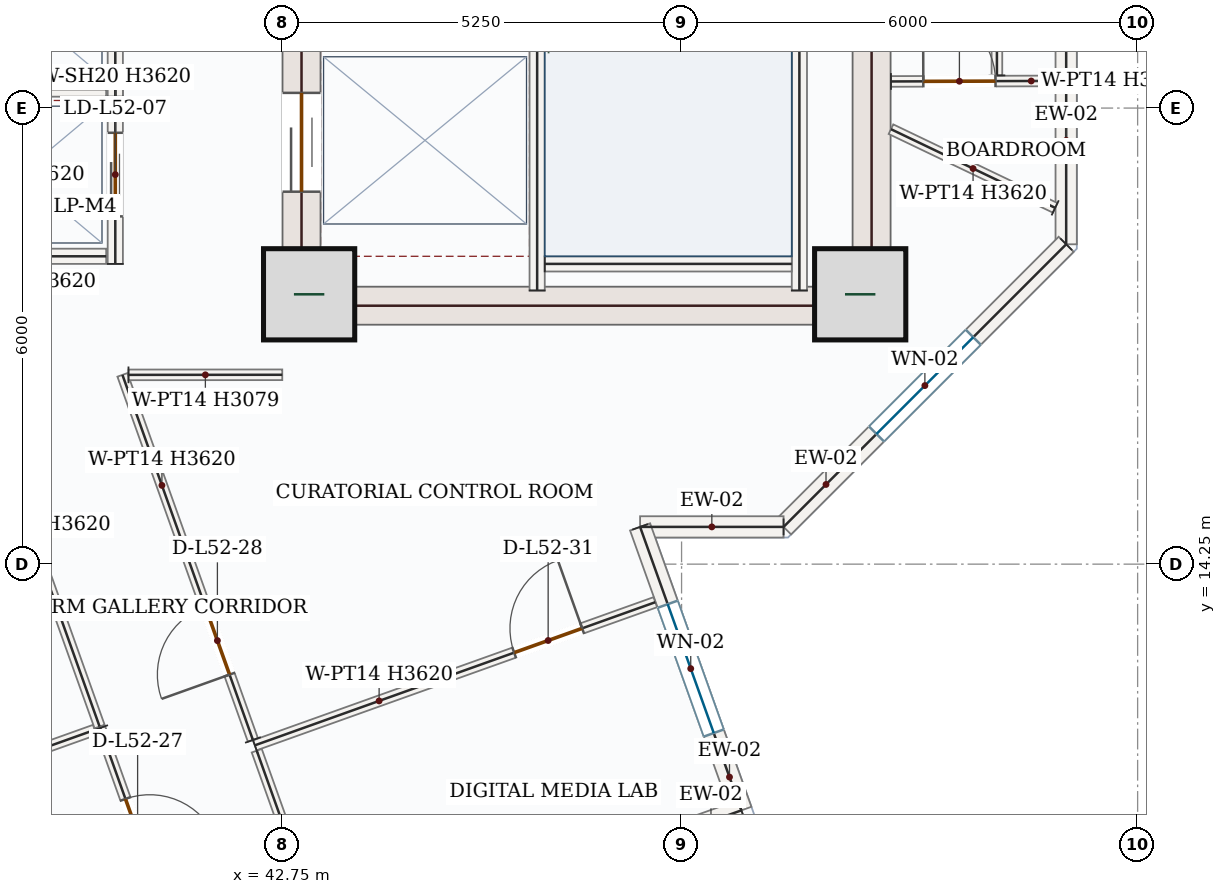
"""IFC4 building model, lengths in metres.
Left out: names, types, materials, properties, quantities, classifications, styles, units other than length and angle.
Written with IfcOpenShell. Run it as: python <this file> out.ifc"""

import sys

from ifc_helpers import new_model, si_unit, direction, frame, frame_2d, origin, origin_2d, place, context, subcontext, project, spatial, rectangle, extrude, source, transform, mapped, element, fill, save


model = new_model("IFC4")
c1 = context("Model", 3, precision=1e-05, world=origin(), true_north=direction((0.0, 1.0)))
c2 = subcontext(c1, "Body", "Model", "MODEL_VIEW")
j1 = project(units=[si_unit("LENGTHUNIT", "METRE"), si_unit("PLANEANGLEUNIT", "RADIAN")], contexts=[c1])
p1 = place(None, origin())
s1 = spatial("IfcSite", under=j1, at=p1, CompositionType="ELEMENT")
p2 = place(p1, origin())
s2 = spatial("IfcBuilding", under=s1, at=p2, CompositionType="ELEMENT")
p3 = place(p2, frame((0.0, 0.0, 221.4)))
s3 = spatial("IfcBuildingStorey", under=s2, at=p3, CompositionType="ELEMENT", Elevation=221.4)
p4 = place(p3, frame((43.0, 17.4, 0.0), z_axis=(0.0, 0.0, 1.0), x_axis=(0.0, 1.0, 0.0)))
e1 = element("IfcWall", 1, at=p4, inside=s3, PredefinedType="SHEAR", context=c2, shape_type="SweptSolid", body=[
    extrude(rectangle(XDim=8.55, YDim=0.5, at=frame_2d((4.275, 0.0))), origin(), (0.0, 0.0, 1.0), 3.62),
])
p5 = place(p4, frame((6.65, 0.0, 0.0)))
e2 = element("IfcOpeningElement", 2, at=p5, cuts=e1, PredefinedType="OPENING", context=c2, shape_type="SweptSolid", body=[
    extrude(rectangle(XDim=1.1, YDim=2.2, at=frame_2d((0.55, 1.1))), frame((0.0, 0.26, 0.0), z_axis=(0.0, -1.0, 0.0), x_axis=(1.0, 0.0, 0.0)), (0.0, 0.0, 1.0), 0.52),
])
p6 = place(p4, frame((1.75, 0.0, 0.0)))
e3 = element("IfcOpeningElement", 3, at=p6, cuts=e1, PredefinedType="OPENING", context=c2, shape_type="SweptSolid", body=[
    extrude(rectangle(XDim=1.3, YDim=2.2, at=frame_2d((0.65, 1.1))), frame((0.0, 0.26, 0.0), z_axis=(0.0, -1.0, 0.0), x_axis=(1.0, 0.0, 0.0)), (0.0, 0.0, 1.0), 0.52),
])
p7 = place(p4, frame((4.55, 0.0, 0.0)))
e4 = element("IfcOpeningElement", 4, at=p7, cuts=e1, PredefinedType="OPENING", context=c2, shape_type="SweptSolid", body=[
    extrude(rectangle(XDim=0.88, YDim=2.1, at=frame_2d((0.44, 1.05))), frame((0.0, 0.26, 0.0), z_axis=(0.0, -1.0, 0.0), x_axis=(1.0, 0.0, 0.0)), (0.0, 0.0, 1.0), 0.52),
])
m1 = source(origin(), c2, "Body", "SweptSolid", [
    extrude(rectangle(XDim=8.55, YDim=0.5, at=frame_2d((4.275, 0.0))), origin(), (0.0, 0.0, 1.0), 3.62),
])
p8 = place(p3, frame((50.5, 17.4, 0.0), z_axis=(0.0, 0.0, 1.0), x_axis=(0.0, 1.0, 0.0)))
e5 = element("IfcWall", 5, at=p8, inside=s3, PredefinedType="SHEAR", context=c2, shape_type="MappedRepresentation", body=[
    mapped(m1, transform((0.0, 0.0, 0.0), x_axis=(1.0, 0.0, 0.0), y_axis=(0.0, 1.0, 0.0), z_axis=(0.0, 0.0, 1.0), scale=1.0)),
])
m2 = source(origin(), c2, "Body", "SweptSolid", [
    extrude(rectangle(XDim=7.0, YDim=0.5, at=frame_2d((3.5, 0.0))), origin(), (0.0, 0.0, 1.0), 3.62),
])
p9 = place(p3, frame((43.25, 17.65, 0.0), z_axis=(0.0, 0.0, 1.0), x_axis=(1.0, 0.0, 0.0)))
e6 = element("IfcWall", 6, at=p9, inside=s3, PredefinedType="SHEAR", context=c2, shape_type="MappedRepresentation", body=[
    mapped(m2, transform((0.0, 0.0, 0.0), x_axis=(1.0, 0.0, 0.0), y_axis=(0.0, 1.0, 0.0), z_axis=(0.0, 0.0, 1.0), scale=1.0)),
])
m3 = source(origin(), c2, "Body", "SweptSolid", [
    extrude(rectangle(XDim=1.2, YDim=1.2, at=origin_2d()), origin(), (0.0, 0.0, 1.0), 3.9),
])
for number, where, z_axis, x_axis in (
    (7, (43.1, 17.8, 0.0), (0.0, 0.0, 1.0), (1.0, 0.0, 0.0)),
    (8, (50.35, 17.8, 0.0), (0.0, 0.0, 1.0), (1.0, 0.0, 0.0)),
):
    element("IfcColumn", number, at=place(p3, frame(where, z_axis=z_axis, x_axis=x_axis)), inside=s3, PredefinedType="COLUMN", context=c2, shape_type="MappedRepresentation", body=[
        mapped(m3, transform((0.0, 0.0, 0.0), x_axis=(1.0, 0.0, 0.0), y_axis=(0.0, 1.0, 0.0), z_axis=(0.0, 0.0, 1.0), scale=1.0)),
    ])
p10 = place(p3, frame((53.06, 26.025, 0.0), z_axis=(0.0, 0.0, 1.0), x_axis=(0.0, -1.0, 0.0)))
e9 = element("IfcWall", 9, at=p10, inside=s3, PredefinedType="SOLIDWALL", context=c2, shape_type="SweptSolid", body=[
    extrude(rectangle(XDim=7.567, YDim=0.28, at=frame_2d((3.783, 0.0))), origin(), (0.0, 0.0, 1.0), 3.62),
])
p11 = place(p10, frame((2.883, 0.0, 0.85)))
e10 = element("IfcOpeningElement", 10, at=p11, cuts=e9, PredefinedType="OPENING", context=c2, shape_type="SweptSolid", body=[
    extrude(rectangle(XDim=1.8, YDim=1.75, at=frame_2d((0.9, 0.875))), frame((0.0, 0.15, 0.0), z_axis=(0.0, -1.0, 0.0), x_axis=(1.0, 0.0, 0.0)), (0.0, 0.0, 1.0), 0.3),
])
p12 = place(p3, frame((53.06, 18.458, 0.0), z_axis=(0.0, 0.0, 1.0), x_axis=(-0.707106781187, -0.707106781187, 0.0)))
e11 = element("IfcWall", 11, at=p12, inside=s3, PredefinedType="SOLIDWALL", context=c2, shape_type="SweptSolid", body=[
    extrude(rectangle(XDim=5.258, YDim=0.28, at=frame_2d((2.629, 0.0))), origin(), (0.0, 0.0, 1.0), 3.62),
])
p13 = place(p12, frame((1.729, 0.0, 0.85)))
e12 = element("IfcOpeningElement", 12, at=p13, cuts=e11, PredefinedType="OPENING", context=c2, shape_type="SweptSolid", body=[
    extrude(rectangle(XDim=1.8, YDim=1.75, at=frame_2d((0.9, 0.875))), frame((0.0, 0.15, 0.0), z_axis=(0.0, -1.0, 0.0), x_axis=(1.0, 0.0, 0.0)), (0.0, 0.0, 1.0), 0.3),
])
m4 = source(origin(), c2, "Body", "SweptSolid", [
    extrude(rectangle(XDim=1.888, YDim=0.28, at=frame_2d((0.944, 0.0))), origin(), (0.0, 0.0, 1.0), 3.62),
])
p14 = place(p3, frame((49.342, 14.74, 0.0), z_axis=(0.0, 0.0, 1.0), x_axis=(-1.0, 0.0, 0.0)))
e13 = element("IfcWall", 13, at=p14, inside=s3, PredefinedType="SOLIDWALL", context=c2, shape_type="MappedRepresentation", body=[
    mapped(m4, transform((0.0, 0.0, 0.0), x_axis=(1.0, 0.0, 0.0), y_axis=(0.0, 1.0, 0.0), z_axis=(0.0, 0.0, 1.0), scale=1.0)),
])
p15 = place(p3, frame((47.454, 14.74, 0.0), z_axis=(0.0, 0.0, 1.0), x_axis=(0.336590223561, -0.941651220677, 0.0)))
e14 = element("IfcWall", 14, at=p15, inside=s3, PredefinedType="SOLIDWALL", context=c2, shape_type="SweptSolid", body=[
    extrude(rectangle(XDim=3.96, YDim=0.28, at=frame_2d((1.98, 0.0))), origin(), (0.0, 0.0, 1.0), 3.62),
])
p16 = place(p15, frame((1.08, 0.0, 0.85)))
e15 = element("IfcOpeningElement", 15, at=p16, cuts=e14, PredefinedType="OPENING", context=c2, shape_type="SweptSolid", body=[
    extrude(rectangle(XDim=1.8, YDim=1.75, at=frame_2d((0.9, 0.875))), frame((0.0, 0.15, 0.0), z_axis=(0.0, -1.0, 0.0), x_axis=(1.0, 0.0, 0.0)), (0.0, 0.0, 1.0), 0.3),
])
m5 = source(origin(), c2, "Body", "SweptSolid", [
    extrude(rectangle(XDim=0.85, YDim=0.28, at=frame_2d((0.425, 0.0))), origin(), (0.0, 0.0, 1.0), 3.62),
])
p17 = place(p3, frame((48.787, 11.011, 0.0), z_axis=(0.0, 0.0, 1.0), x_axis=(-0.941657417713, -0.336572886112, 0.0)))
e16 = element("IfcWall", 16, at=p17, inside=s3, PredefinedType="SOLIDWALL", context=c2, shape_type="MappedRepresentation", body=[
    mapped(m5, transform((0.0, 0.0, 0.0), x_axis=(1.0, 0.0, 0.0), y_axis=(0.0, 1.0, 0.0), z_axis=(0.0, 0.0, 1.0), scale=1.0)),
])
m6 = source(origin(), c2, "Body", "SweptSolid", [
    extrude(rectangle(XDim=7.87, YDim=0.2, at=frame_2d((3.935, 0.0))), origin(), (0.0, 0.0, 1.0), 3.62),
])
p18 = place(p3, frame((49.55, 17.85, 0.0), z_axis=(0.0, 0.0, 1.0), x_axis=(0.0, 1.0, 0.0)))
e17 = element("IfcWall", 17, at=p18, inside=s3, PredefinedType="SOLIDWALL", context=c2, shape_type="MappedRepresentation", body=[
    mapped(m6, transform((0.0, 0.0, 0.0), x_axis=(1.0, 0.0, 0.0), y_axis=(0.0, 1.0, 0.0), z_axis=(0.0, 0.0, 1.0), scale=1.0)),
])
p19 = place(p3, frame((46.1, 17.85, 0.0), z_axis=(0.0, 0.0, 1.0), x_axis=(0.0, 1.0, 0.0)))
e18 = element("IfcWall", 18, at=p19, inside=s3, PredefinedType="SOLIDWALL", context=c2, shape_type="SweptSolid", body=[
    extrude(rectangle(XDim=8.0, YDim=0.2, at=frame_2d((4.0, 0.0))), origin(), (0.0, 0.0, 1.0), 3.62),
])
p20 = place(p19, frame((6.3, 0.0, 0.0)))
e19 = element("IfcOpeningElement", 19, at=p20, cuts=e18, PredefinedType="OPENING", context=c2, shape_type="SweptSolid", body=[
    extrude(rectangle(XDim=1.05, YDim=2.15, at=frame_2d((0.525, 1.075))), frame((0.0, 0.11, 0.0), z_axis=(0.0, -1.0, 0.0), x_axis=(1.0, 0.0, 0.0)), (0.0, 0.0, 1.0), 0.22),
])
m7 = source(origin(), c2, "Body", "SweptSolid", [
    extrude(rectangle(XDim=3.25, YDim=0.2, at=frame_2d((1.625, 0.0))), origin(), (0.0, 0.0, 1.0), 3.62),
])
p21 = place(p3, frame((46.2, 18.2, 0.0), z_axis=(0.0, 0.0, 1.0), x_axis=(1.0, 0.0, 0.0)))
e20 = element("IfcWall", 20, at=p21, inside=s3, PredefinedType="SOLIDWALL", context=c2, shape_type="MappedRepresentation", body=[
    mapped(m7, transform((0.0, 0.0, 0.0), x_axis=(1.0, 0.0, 0.0), y_axis=(0.0, 1.0, 0.0), z_axis=(0.0, 0.0, 1.0), scale=1.0)),
])
p22 = place(p3, frame((40.55, 20.4, 0.0), z_axis=(0.0, 0.0, 1.0), x_axis=(0.0, 1.0, 0.0)))
e21 = element("IfcWall", 21, at=p22, inside=s3, PredefinedType="SOLIDWALL", context=c2, shape_type="SweptSolid", body=[
    extrude(rectangle(XDim=2.35, YDim=0.2, at=frame_2d((1.175, 0.0))), origin(), (0.0, 0.0, 1.0), 3.62),
])
p23 = place(p22, frame((0.625, 0.0, 0.0)))
e22 = element("IfcOpeningElement", 22, at=p23, cuts=e21, PredefinedType="OPENING", context=c2, shape_type="SweptSolid", body=[
    extrude(rectangle(XDim=1.1, YDim=2.15, at=frame_2d((0.55, 1.075))), frame((0.0, 0.11, 0.0), z_axis=(0.0, -1.0, 0.0), x_axis=(1.0, 0.0, 0.0)), (0.0, 0.0, 1.0), 0.22),
])
m8 = source(origin(), c2, "Body", "SweptSolid", [
    extrude(rectangle(XDim=2.26, YDim=0.2, at=frame_2d((1.13, 0.0))), origin(), (0.0, 0.0, 1.0), 3.62),
])
p24 = place(p3, frame((38.17, 20.5, 0.0), z_axis=(0.0, 0.0, 1.0), x_axis=(1.0, 0.0, 0.0)))
e23 = element("IfcWall", 23, at=p24, inside=s3, PredefinedType="SOLIDWALL", context=c2, shape_type="MappedRepresentation", body=[
    mapped(m8, transform((0.0, 0.0, 0.0), x_axis=(1.0, 0.0, 0.0), y_axis=(0.0, 1.0, 0.0), z_axis=(0.0, 0.0, 1.0), scale=1.0)),
])
p25 = place(p3, frame((40.55, 18.2, 0.0), z_axis=(0.0, 0.0, 1.0), x_axis=(0.0, 1.0, 0.0)))
e24 = element("IfcWall", 24, at=p25, inside=s3, PredefinedType="SOLIDWALL", context=c2, shape_type="SweptSolid", body=[
    extrude(rectangle(XDim=2.35, YDim=0.2, at=frame_2d((1.175, 0.0))), origin(), (0.0, 0.0, 1.0), 3.62),
])
p26 = place(p25, frame((0.625, 0.0, 0.0)))
e25 = element("IfcOpeningElement", 25, at=p26, cuts=e24, PredefinedType="OPENING", context=c2, shape_type="SweptSolid", body=[
    extrude(rectangle(XDim=1.1, YDim=2.15, at=frame_2d((0.55, 1.075))), frame((0.0, 0.11, 0.0), z_axis=(0.0, -1.0, 0.0), x_axis=(1.0, 0.0, 0.0)), (0.0, 0.0, 1.0), 0.22),
])
p27 = place(p3, frame((38.17, 18.3, 0.0), z_axis=(0.0, 0.0, 1.0), x_axis=(1.0, 0.0, 0.0)))
e26 = element("IfcWall", 26, at=p27, inside=s3, PredefinedType="SOLIDWALL", context=c2, shape_type="MappedRepresentation", body=[
    mapped(m8, transform((0.0, 0.0, 0.0), x_axis=(1.0, 0.0, 0.0), y_axis=(0.0, 1.0, 0.0), z_axis=(0.0, 0.0, 1.0), scale=1.0)),
])
p28 = place(p3, frame((50.755, 20.6, 0.0), z_axis=(0.0, 0.0, 1.0), x_axis=(0.999994277874, 0.003382930575, 0.0)))
e27 = element("IfcWall", 27, at=p28, inside=s3, PredefinedType="PARTITIONING", context=c2, shape_type="SweptSolid", body=[
    extrude(rectangle(XDim=2.165, YDim=0.14, at=frame_2d((1.083, 0.0))), origin(), (0.0, 0.0, 1.0), 3.62),
])
p29 = place(p28, frame((0.425, 0.0, 0.0)))
e28 = element("IfcOpeningElement", 28, at=p29, cuts=e27, PredefinedType="OPENING", context=c2, shape_type="SweptSolid", body=[
    extrude(rectangle(XDim=0.95, YDim=2.15, at=frame_2d((0.475, 1.075))), frame((0.0, 0.08, 0.0), z_axis=(0.0, -1.0, 0.0), x_axis=(1.0, 0.0, 0.0)), (0.0, 0.0, 1.0), 0.16),
])
m9 = source(origin(), c2, "Body", "SweptSolid", [
    extrude(rectangle(XDim=9.038, YDim=0.14, at=frame_2d((4.519, 0.0))), origin(), (0.0, 0.0, 1.0), 2.693),
])
p30 = place(p3, frame((52.149, 20.68, 0.0), z_axis=(0.0, 0.0, 1.0), x_axis=(0.000135065776, 0.999999990879, 0.0)))
e29 = element("IfcWall", 29, at=p30, inside=s3, PredefinedType="PARTITIONING", context=c2, shape_type="MappedRepresentation", body=[
    mapped(m9, transform((0.0, 0.0, 0.0), x_axis=(1.0, 0.0, 0.0), y_axis=(0.0, 1.0, 0.0), z_axis=(0.0, 0.0, 1.0), scale=1.0)),
])
m10 = source(origin(), c2, "Body", "SweptSolid", [
    extrude(rectangle(XDim=2.395, YDim=0.14, at=frame_2d((1.198, 0.0))), origin(), (0.0, 0.0, 1.0), 3.62),
])
p31 = place(p3, frame((52.915, 18.937, 0.0), z_axis=(0.0, 0.0, 1.0), x_axis=(-0.90180278892, 0.432147810242, 0.0)))
e30 = element("IfcWall", 30, at=p31, inside=s3, PredefinedType="PARTITIONING", context=c2, shape_type="MappedRepresentation", body=[
    mapped(m10, transform((0.0, 0.0, 0.0), x_axis=(1.0, 0.0, 0.0), y_axis=(0.0, 1.0, 0.0), z_axis=(0.0, 0.0, 1.0), scale=1.0)),
])
p32 = place(p3, frame((42.386, 11.866, 0.0), z_axis=(0.0, 0.0, 1.0), x_axis=(0.94166093099, 0.336563056568, 0.0)))
e31 = element("IfcWall", 31, at=p32, inside=s3, PredefinedType="PARTITIONING", context=c2, shape_type="SweptSolid", body=[
    extrude(rectangle(XDim=5.595, YDim=0.14, at=frame_2d((2.797, 0.0))), origin(), (0.0, 0.0, 1.0), 3.62),
])
p33 = place(p32, frame((3.623, 0.0, 0.0)))
e32 = element("IfcOpeningElement", 32, at=p33, cuts=e31, PredefinedType="OPENING", context=c2, shape_type="SweptSolid", body=[
    extrude(rectangle(XDim=0.95, YDim=2.15, at=frame_2d((0.475, 1.075))), frame((0.0, 0.08, 0.0), z_axis=(0.0, -1.0, 0.0), x_axis=(1.0, 0.0, 0.0)), (0.0, 0.0, 1.0), 0.16),
])
m11 = source(origin(), c2, "Body", "SweptSolid", [
    extrude(rectangle(XDim=4.48, YDim=0.14, at=frame_2d((2.24, 0.0))), origin(), (0.0, 0.0, 1.0), 3.62),
])
p34 = place(p3, frame((43.919, 7.577, 0.0), z_axis=(0.0, 0.0, 1.0), x_axis=(-0.336557324255, 0.941662979781, 0.0)))
e33 = element("IfcWall", 33, at=p34, inside=s3, PredefinedType="PARTITIONING", context=c2, shape_type="MappedRepresentation", body=[
    mapped(m11, transform((0.0, 0.0, 0.0), x_axis=(1.0, 0.0, 0.0), y_axis=(0.0, 1.0, 0.0), z_axis=(0.0, 0.0, 1.0), scale=1.0)),
])
p35 = place(p3, frame((40.35, 12.094, 0.0), z_axis=(0.0, 0.0, 1.0), x_axis=(0.336563203689, -0.941660878407, 0.0)))
e34 = element("IfcWall", 34, at=p35, inside=s3, PredefinedType="PARTITIONING", context=c2, shape_type="SweptSolid", body=[
    extrude(rectangle(XDim=5.455, YDim=0.14, at=frame_2d((2.728, 0.0))), origin(), (0.0, 0.0, 1.0), 3.62),
])
p36 = place(p35, frame((0.991, 0.0, 0.0)))
e35 = element("IfcOpeningElement", 35, at=p36, cuts=e34, PredefinedType="OPENING", context=c2, shape_type="SweptSolid", body=[
    extrude(rectangle(XDim=0.95, YDim=2.15, at=frame_2d((0.475, 1.075))), frame((0.0, 0.08, 0.0), z_axis=(0.0, -1.0, 0.0), x_axis=(1.0, 0.0, 0.0)), (0.0, 0.0, 1.0), 0.16),
])
m12 = source(origin(), c2, "Body", "SweptSolid", [
    extrude(rectangle(XDim=3.774, YDim=0.14, at=frame_2d((1.887, 0.0))), origin(), (0.0, 0.0, 1.0), 3.62),
])
p37 = place(p3, frame((36.725, 10.799, 0.0), z_axis=(0.0, 0.0, 1.0), x_axis=(0.94166578898, 0.336549464216, 0.0)))
e36 = element("IfcWall", 36, at=p37, inside=s3, PredefinedType="PARTITIONING", context=c2, shape_type="MappedRepresentation", body=[
    mapped(m12, transform((0.0, 0.0, 0.0), x_axis=(1.0, 0.0, 0.0), y_axis=(0.0, 1.0, 0.0), z_axis=(0.0, 0.0, 1.0), scale=1.0)),
])
m13 = source(origin(), c2, "Body", "SweptSolid", [
    extrude(rectangle(XDim=4.913, YDim=0.14, at=frame_2d((2.457, 0.0))), origin(), (0.0, 0.0, 1.0), 3.62),
])
p38 = place(p3, frame((38.69, 16.74, 0.0), z_axis=(0.0, 0.0, 1.0), x_axis=(0.336547288081, -0.941666566724, 0.0)))
e37 = element("IfcWall", 37, at=p38, inside=s3, PredefinedType="PARTITIONING", context=c2, shape_type="MappedRepresentation", body=[
    mapped(m13, transform((0.0, 0.0, 0.0), x_axis=(1.0, 0.0, 0.0), y_axis=(0.0, 1.0, 0.0), z_axis=(0.0, 0.0, 1.0), scale=1.0)),
])
p39 = place(p3, frame((42.361, 11.937, 0.0), z_axis=(0.0, 0.0, 1.0), x_axis=(-0.336588056289, 0.941651995359, 0.0)))
e38 = element("IfcWall", 38, at=p39, inside=s3, PredefinedType="PARTITIONING", context=c2, shape_type="SweptSolid", body=[
    extrude(rectangle(XDim=5.101, YDim=0.14, at=frame_2d((2.55, 0.0))), origin(), (0.0, 0.0, 1.0), 3.62),
])
p40 = place(p39, frame((0.913, 0.0, 0.0)))
e39 = element("IfcOpeningElement", 39, at=p40, cuts=e38, PredefinedType="OPENING", context=c2, shape_type="SweptSolid", body=[
    extrude(rectangle(XDim=0.95, YDim=2.15, at=frame_2d((0.475, 1.075))), frame((0.0, 0.08, 0.0), z_axis=(0.0, -1.0, 0.0), x_axis=(1.0, 0.0, 0.0)), (0.0, 0.0, 1.0), 0.16),
])
m14 = source(origin(), c2, "Body", "SweptSolid", [
    extrude(rectangle(XDim=2.023, YDim=0.14, at=frame_2d((1.012, 0.0))), origin(), (0.0, 0.0, 1.0), 3.079),
])
p41 = place(p3, frame((40.723, 16.74, 0.0), z_axis=(0.0, 0.0, 1.0), x_axis=(0.999999817982, 0.000603354542, 0.0)))
e40 = element("IfcWall", 40, at=p41, inside=s3, PredefinedType="PARTITIONING", context=c2, shape_type="MappedRepresentation", body=[
    mapped(m14, transform((0.0, 0.0, 0.0), x_axis=(1.0, 0.0, 0.0), y_axis=(0.0, 1.0, 0.0), z_axis=(0.0, 0.0, 1.0), scale=1.0)),
])
m15 = source(origin(), c2, "Body", "SweptSolid", [
    extrude(rectangle(XDim=1.8, YDim=1.75, at=frame_2d((0.9, 0.875))), frame((0.0, 0.03, 0.0), z_axis=(0.0, -1.0, 0.0), x_axis=(1.0, 0.0, 0.0)), (0.0, 0.0, 1.0), 0.06),
])
p42 = place(p13, origin())
e41 = element("IfcWindow", 41, at=p42, inside=s3, PartitioningType="DOUBLE_PANEL_VERTICAL", PredefinedType="WINDOW", context=c2, shape_type="MappedRepresentation", body=[
    mapped(m15, transform((0.0, 0.0, 0.0), x_axis=(1.0, 0.0, 0.0), y_axis=(0.0, 1.0, 0.0), z_axis=(0.0, 0.0, 1.0), scale=1.0)),
])
fill(e12, e41)
p43 = place(p16, origin())
e42 = element("IfcWindow", 42, at=p43, inside=s3, PartitioningType="DOUBLE_PANEL_VERTICAL", PredefinedType="WINDOW", context=c2, shape_type="MappedRepresentation", body=[
    mapped(m15, transform((0.0, 0.0, 0.0), x_axis=(1.0, 0.0, 0.0), y_axis=(0.0, 1.0, 0.0), z_axis=(0.0, 0.0, 1.0), scale=1.0)),
])
fill(e15, e42)
m16 = source(origin(), c2, "Body", "SweptSolid", [
    extrude(rectangle(XDim=1.3, YDim=2.2, at=frame_2d((0.65, 1.1))), frame((0.0, 0.025, 0.0), z_axis=(0.0, -1.0, 0.0), x_axis=(1.0, 0.0, 0.0)), (0.0, 0.0, 1.0), 0.05),
])
p44 = place(p6, origin())
e43 = element("IfcDoor", 43, at=p44, inside=s3, OperationType="DOUBLE_DOOR_SLIDING", PredefinedType="DOOR", context=c2, shape_type="MappedRepresentation", body=[
    mapped(m16, transform((0.0, 0.0, 0.0), x_axis=(1.0, 0.0, 0.0), y_axis=(0.0, 1.0, 0.0), z_axis=(0.0, 0.0, 1.0), scale=1.0)),
])
fill(e3, e43)
m17 = source(origin(), c2, "Body", "SweptSolid", [
    extrude(rectangle(XDim=1.1, YDim=2.15, at=frame_2d((0.55, 1.075))), frame((0.0, 0.025, 0.0), z_axis=(0.0, -1.0, 0.0), x_axis=(1.0, 0.0, 0.0)), (0.0, 0.0, 1.0), 0.05),
])
p45 = place(p26, origin())
e44 = element("IfcDoor", 44, at=p45, inside=s3, OperationType="DOUBLE_DOOR_SLIDING", PredefinedType="DOOR", context=c2, shape_type="MappedRepresentation", body=[
    mapped(m17, transform((0.0, 0.0, 0.0), x_axis=(1.0, 0.0, 0.0), y_axis=(0.0, 1.0, 0.0), z_axis=(0.0, 0.0, 1.0), scale=1.0)),
])
fill(e25, e44)
m18 = source(origin(), c2, "Body", "SweptSolid", [
    extrude(rectangle(XDim=0.95, YDim=2.15, at=frame_2d((0.475, 1.075))), frame((0.0, 0.025, 0.0), z_axis=(0.0, -1.0, 0.0), x_axis=(1.0, 0.0, 0.0)), (0.0, 0.0, 1.0), 0.05),
])
p46 = place(p29, origin())
e45 = element("IfcDoor", 45, at=p46, inside=s3, OperationType="SINGLE_SWING_LEFT", PredefinedType="DOOR", context=c2, shape_type="MappedRepresentation", body=[
    mapped(m18, transform((0.0, 0.0, 0.0), x_axis=(1.0, 0.0, 0.0), y_axis=(0.0, 1.0, 0.0), z_axis=(0.0, 0.0, 1.0), scale=1.0)),
])
fill(e28, e45)
p47 = place(p36, origin())
e46 = element("IfcDoor", 46, at=p47, inside=s3, OperationType="SINGLE_SWING_RIGHT", PredefinedType="DOOR", context=c2, shape_type="MappedRepresentation", body=[
    mapped(m18, transform((0.0, 0.0, 0.0), x_axis=(1.0, 0.0, 0.0), y_axis=(0.0, 1.0, 0.0), z_axis=(0.0, 0.0, 1.0), scale=1.0)),
])
fill(e35, e46)
p48 = place(p40, origin())
e47 = element("IfcDoor", 47, at=p48, inside=s3, OperationType="SINGLE_SWING_LEFT", PredefinedType="DOOR", context=c2, shape_type="MappedRepresentation", body=[
    mapped(m18, transform((0.0, 0.0, 0.0), x_axis=(1.0, 0.0, 0.0), y_axis=(0.0, 1.0, 0.0), z_axis=(0.0, 0.0, 1.0), scale=1.0)),
])
fill(e39, e47)
p49 = place(p33, origin())
e48 = element("IfcDoor", 48, at=p49, inside=s3, OperationType="SINGLE_SWING_RIGHT", PredefinedType="DOOR", context=c2, shape_type="MappedRepresentation", body=[
    mapped(m18, transform((0.0, 0.0, 0.0), x_axis=(1.0, 0.0, 0.0), y_axis=(0.0, 1.0, 0.0), z_axis=(0.0, 0.0, 1.0), scale=1.0)),
])
fill(e32, e48)
save(model, sys.argv[1])
